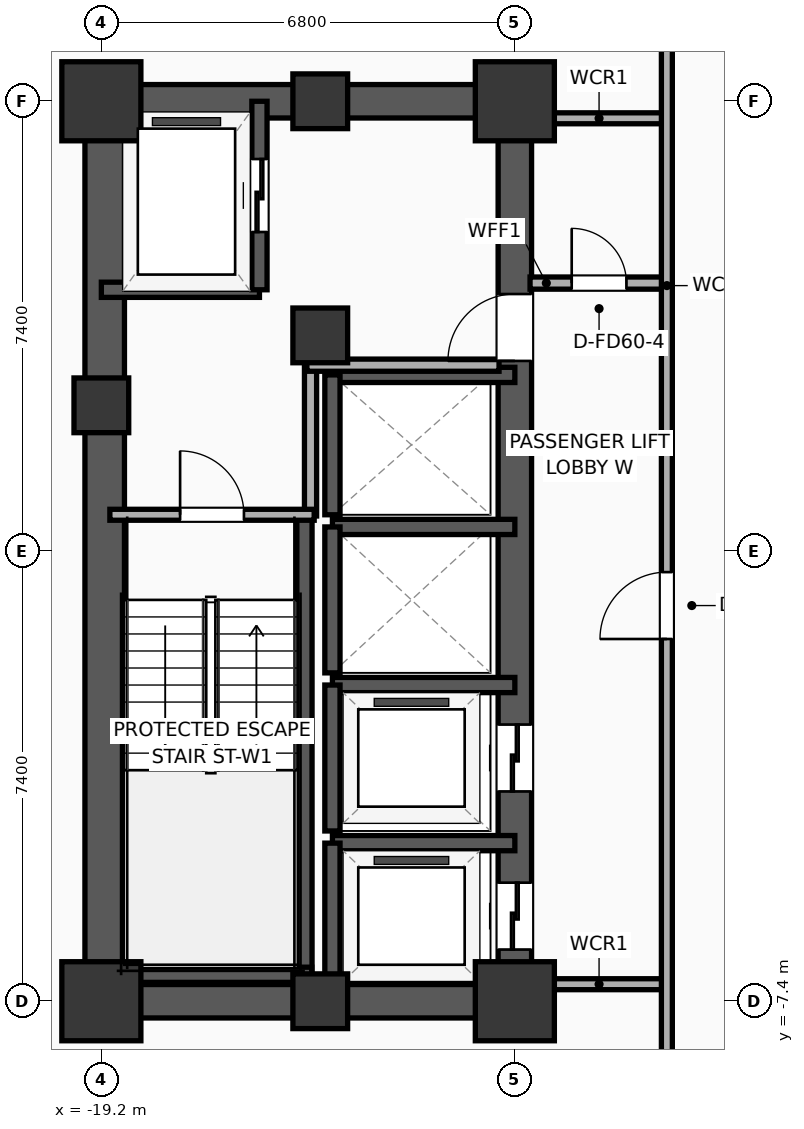
"""IFC4 building model, lengths in metres.
Left out: names, types, materials, properties, quantities, classifications, styles, units other than length and angle.
Written with IfcOpenShell. Run it as: python <this file> out.ifc"""

import sys

from ifc_helpers import new_model, si_unit, direction, frame, frame_2d, origin, origin_2d, place, context, subcontext, project, spatial, rectangle, extrude, element, fill, save


model = new_model("IFC4")
c1 = context("Model", 3, precision=1e-05, world=origin(), true_north=direction((0.0, 1.0)))
c2 = subcontext(c1, "Body", "Model", "MODEL_VIEW")
j1 = project(units=[si_unit("LENGTHUNIT", "METRE"), si_unit("PLANEANGLEUNIT", "RADIAN")], contexts=[c1])
p1 = place(None, origin())
s1 = spatial("IfcSite", under=j1, at=p1, CompositionType="ELEMENT")
p2 = place(p1, origin())
s2 = spatial("IfcBuilding", under=s1, at=p2, CompositionType="ELEMENT")
p3 = place(p2, frame((0.0, 0.0, 117.0)))
s3 = spatial("IfcBuildingStorey", under=s2, at=p3, CompositionType="ELEMENT", Elevation=117.0)
p4 = place(p3, frame((-19.2, -7.4, 0.0), z_axis=(0.0, 0.0, 1.0), x_axis=(1.0, 0.0, 0.0)))
e1 = element("IfcColumn", 1, at=p4, inside=s3, PredefinedType="COLUMN", context=c2, shape_type="SweptSolid", body=[
    extrude(rectangle(XDim=1.3, YDim=1.3, at=origin_2d()), origin(), (0.0, 0.0, 1.0), 3.9),
])
p5 = place(p3, frame((-19.2, 2.4, 0.0), z_axis=(0.0, 0.0, 1.0), x_axis=(1.0, 0.0, 0.0)))
e2 = element("IfcColumn", 2, at=p5, inside=s3, PredefinedType="COLUMN", context=c2, shape_type="SweptSolid", body=[
    extrude(rectangle(XDim=0.9, YDim=0.9, at=origin_2d()), origin(), (0.0, 0.0, 1.0), 3.9),
])
p6 = place(p3, frame((-19.2, 7.4, 0.0), z_axis=(0.0, 0.0, 1.0), x_axis=(1.0, 0.0, 0.0)))
e3 = element("IfcColumn", 3, at=p6, inside=s3, PredefinedType="COLUMN", context=c2, shape_type="SweptSolid", body=[
    extrude(rectangle(XDim=1.3, YDim=1.3, at=origin_2d()), origin(), (0.0, 0.0, 1.0), 3.9),
])
for number, where, z_axis, x_axis in (
    (4, (-15.6, -7.4, 0.0), (0.0, 0.0, 1.0), (1.0, 0.0, 0.0)),
    (5, (-15.6, 7.4, 0.0), (0.0, 0.0, 1.0), (1.0, 0.0, 0.0)),
):
    element("IfcColumn", number, at=place(p3, frame(where, z_axis=z_axis, x_axis=x_axis)), inside=s3, PredefinedType="COLUMN", context=c2, shape_type="SweptSolid", body=[
        extrude(rectangle(XDim=0.9, YDim=0.9, at=origin_2d()), origin(), (0.0, 0.0, 1.0), 3.9),
    ])
p7 = place(p3, frame((-12.4, -7.4, 0.0), z_axis=(0.0, 0.0, 1.0), x_axis=(1.0, 0.0, 0.0)))
e6 = element("IfcColumn", 6, at=p7, inside=s3, PredefinedType="COLUMN", context=c2, shape_type="SweptSolid", body=[
    extrude(rectangle(XDim=1.3, YDim=1.3, at=origin_2d()), origin(), (0.0, 0.0, 1.0), 3.9),
])
p8 = place(p3, frame((-15.6, 3.55, 0.0), z_axis=(0.0, 0.0, 1.0), x_axis=(1.0, 0.0, 0.0)))
e7 = element("IfcColumn", 7, at=p8, inside=s3, PredefinedType="COLUMN", context=c2, shape_type="SweptSolid", body=[
    extrude(rectangle(XDim=0.9, YDim=0.9, at=origin_2d()), origin(), (0.0, 0.0, 1.0), 3.9),
])
p9 = place(p3, frame((-12.4, 7.4, 0.0), z_axis=(0.0, 0.0, 1.0), x_axis=(1.0, 0.0, 0.0)))
e8 = element("IfcColumn", 8, at=p9, inside=s3, PredefinedType="COLUMN", context=c2, shape_type="SweptSolid", body=[
    extrude(rectangle(XDim=1.3, YDim=1.3, at=origin_2d()), origin(), (0.0, 0.0, 1.0), 3.9),
])
for number, where, z_axis, x_axis in (
    (9, (-19.475, -7.4, 0.0), (0.0, 0.0, 1.0), (1.0, 0.0, 0.0)),
    (10, (-19.475, 7.4, 0.0), (0.0, 0.0, 1.0), (1.0, 0.0, 0.0)),
):
    element("IfcWall", number, at=place(p3, frame(where, z_axis=z_axis, x_axis=x_axis)), inside=s3, PredefinedType="SHEAR", context=c2, shape_type="SweptSolid", body=[
        extrude(rectangle(XDim=7.35, YDim=0.55, at=frame_2d((3.675, 0.0))), origin(), (0.0, 0.0, 1.0), 3.65),
    ])
p10 = place(p3, frame((-19.145, -7.4, 0.0), z_axis=(0.0, 0.0, 1.0), x_axis=(0.0, 1.0, 0.0)))
e11 = element("IfcWall", 11, at=p10, inside=s3, PredefinedType="SHEAR", context=c2, shape_type="SweptSolid", body=[
    extrude(rectangle(XDim=14.8, YDim=0.65, at=frame_2d((7.4, 0.0))), origin(), (0.0, 0.0, 1.0), 3.65),
])
p11 = place(p3, frame((-12.4, -7.4, 0.0), z_axis=(0.0, 0.0, 1.0), x_axis=(0.0, 1.0, 0.0)))
e12 = element("IfcWall", 12, at=p11, inside=s3, PredefinedType="SHEAR", context=c2, shape_type="SweptSolid", body=[
    extrude(rectangle(XDim=14.8, YDim=0.55, at=frame_2d((7.4, 0.0))), origin(), (0.0, 0.0, 1.0), 3.65),
])
p12 = place(p11, frame((0.85, 0.0, 0.0)))
e13 = element("IfcOpeningElement", 13, at=p12, cuts=e12, PredefinedType="OPENING", context=c2, shape_type="SweptSolid", body=[
    extrude(rectangle(XDim=1.1, YDim=2.05, at=frame_2d((0.55, 1.025))), frame((0.0, 0.285, 0.0), z_axis=(0.0, -1.0, 0.0), x_axis=(1.0, 0.0, 0.0)), (0.0, 0.0, 1.0), 0.57),
])
p13 = place(p11, frame((3.45, 0.0, 0.0)))
e14 = element("IfcOpeningElement", 14, at=p13, cuts=e12, PredefinedType="OPENING", context=c2, shape_type="SweptSolid", body=[
    extrude(rectangle(XDim=1.1, YDim=2.05, at=frame_2d((0.55, 1.025))), frame((0.0, 0.285, 0.0), z_axis=(0.0, -1.0, 0.0), x_axis=(1.0, 0.0, 0.0)), (0.0, 0.0, 1.0), 0.57),
])
p14 = place(p11, frame((10.53, 0.0, 0.0)))
e15 = element("IfcOpeningElement", 15, at=p14, cuts=e12, PredefinedType="OPENING", context=c2, shape_type="SweptSolid", body=[
    extrude(rectangle(XDim=1.1, YDim=2.05, at=frame_2d((0.55, 1.025))), frame((0.0, 0.285, 0.0), z_axis=(0.0, -1.0, 0.0), x_axis=(1.0, 0.0, 0.0)), (0.0, 0.0, 1.0), 0.57),
])
p15 = place(p3, frame((-15.86, -7.085, 0.0), z_axis=(0.0, 0.0, 1.0), x_axis=(0.0, 1.0, 0.0)))
e16 = element("IfcWall", 16, at=p15, inside=s3, PredefinedType="SOLIDWALL", context=c2, shape_type="SweptSolid", body=[
    extrude(rectangle(XDim=7.685, YDim=0.25, at=frame_2d((3.843, 0.0))), origin(), (0.0, 0.0, 1.0), 3.65),
])
p16 = place(p3, frame((-19.2, -6.965, 0.0), z_axis=(0.0, 0.0, 1.0), x_axis=(1.0, 0.0, 0.0)))
e17 = element("IfcWall", 17, at=p16, inside=s3, PredefinedType="SOLIDWALL", context=c2, shape_type="SweptSolid", body=[
    extrude(rectangle(XDim=3.46, YDim=0.25, at=frame_2d((1.73, 0.0))), origin(), (0.0, 0.0, 1.0), 3.65),
])
p17 = place(p3, frame((-19.2, 4.3, 0.0), z_axis=(0.0, 0.0, 1.0), x_axis=(1.0, 0.0, 0.0)))
e18 = element("IfcWall", 18, at=p17, inside=s3, PredefinedType="SOLIDWALL", context=c2, shape_type="SweptSolid", body=[
    extrude(rectangle(XDim=2.6, YDim=0.25, at=frame_2d((1.3, 0.0))), origin(), (0.0, 0.0, 1.0), 3.65),
])
p18 = place(p3, frame((-16.6, 4.3, 0.0), z_axis=(0.0, 0.0, 1.0), x_axis=(0.0, 1.0, 0.0)))
e19 = element("IfcWall", 19, at=p18, inside=s3, PredefinedType="SOLIDWALL", context=c2, shape_type="SweptSolid", body=[
    extrude(rectangle(XDim=3.1, YDim=0.25, at=frame_2d((1.55, 0.0))), origin(), (0.0, 0.0, 1.0), 3.65),
])
p19 = place(p18, frame((0.95, 0.0, 0.0)))
e20 = element("IfcOpeningElement", 20, at=p19, cuts=e19, PredefinedType="OPENING", context=c2, shape_type="SweptSolid", body=[
    extrude(rectangle(XDim=1.2, YDim=2.05, at=frame_2d((0.6, 1.025))), frame((0.0, 0.135, 0.0), z_axis=(0.0, -1.0, 0.0), x_axis=(1.0, 0.0, 0.0)), (0.0, 0.0, 1.0), 0.27),
])
p20 = place(p3, frame((-12.4, -4.8, 0.0), z_axis=(0.0, 0.0, 1.0), x_axis=(-1.0, 0.0, 0.0)))
e21 = element("IfcWall", 21, at=p20, inside=s3, PredefinedType="SOLIDWALL", context=c2, shape_type="SweptSolid", body=[
    extrude(rectangle(XDim=3.0, YDim=0.25, at=frame_2d((1.5, 0.0))), origin(), (0.0, 0.0, 1.0), 3.65),
])
p21 = place(p3, frame((-15.4, -4.8, 0.0), z_axis=(0.0, 0.0, 1.0), x_axis=(0.0, -1.0, 0.0)))
e22 = element("IfcWall", 22, at=p21, inside=s3, PredefinedType="SOLIDWALL", context=c2, shape_type="SweptSolid", body=[
    extrude(rectangle(XDim=2.6, YDim=0.25, at=frame_2d((1.3, 0.0))), origin(), (0.0, 0.0, 1.0), 3.65),
])
p22 = place(p3, frame((-12.4, -2.2, 0.0), z_axis=(0.0, 0.0, 1.0), x_axis=(-1.0, 0.0, 0.0)))
e23 = element("IfcWall", 23, at=p22, inside=s3, PredefinedType="SOLIDWALL", context=c2, shape_type="SweptSolid", body=[
    extrude(rectangle(XDim=3.0, YDim=0.25, at=frame_2d((1.5, 0.0))), origin(), (0.0, 0.0, 1.0), 3.65),
])
p23 = place(p3, frame((-15.4, -2.2, 0.0), z_axis=(0.0, 0.0, 1.0), x_axis=(0.0, -1.0, 0.0)))
e24 = element("IfcWall", 24, at=p23, inside=s3, PredefinedType="SOLIDWALL", context=c2, shape_type="SweptSolid", body=[
    extrude(rectangle(XDim=2.4, YDim=0.25, at=frame_2d((1.2, 0.0))), origin(), (0.0, 0.0, 1.0), 3.65),
])
p24 = place(p3, frame((-12.4, 0.4, 0.0), z_axis=(0.0, 0.0, 1.0), x_axis=(-1.0, 0.0, 0.0)))
e25 = element("IfcWall", 25, at=p24, inside=s3, PredefinedType="SOLIDWALL", context=c2, shape_type="SweptSolid", body=[
    extrude(rectangle(XDim=3.0, YDim=0.25, at=frame_2d((1.5, 0.0))), origin(), (0.0, 0.0, 1.0), 3.65),
])
p25 = place(p3, frame((-15.4, 0.4, 0.0), z_axis=(0.0, 0.0, 1.0), x_axis=(0.0, -1.0, 0.0)))
e26 = element("IfcWall", 26, at=p25, inside=s3, PredefinedType="SOLIDWALL", context=c2, shape_type="SweptSolid", body=[
    extrude(rectangle(XDim=2.4, YDim=0.25, at=frame_2d((1.2, 0.0))), origin(), (0.0, 0.0, 1.0), 3.65),
])
p26 = place(p3, frame((-12.4, 2.9, 0.0), z_axis=(0.0, 0.0, 1.0), x_axis=(-1.0, 0.0, 0.0)))
e27 = element("IfcWall", 27, at=p26, inside=s3, PredefinedType="SOLIDWALL", context=c2, shape_type="SweptSolid", body=[
    extrude(rectangle(XDim=3.0, YDim=0.25, at=frame_2d((1.5, 0.0))), origin(), (0.0, 0.0, 1.0), 3.65),
])
p27 = place(p3, frame((-15.4, 2.9, 0.0), z_axis=(0.0, 0.0, 1.0), x_axis=(0.0, -1.0, 0.0)))
e28 = element("IfcWall", 28, at=p27, inside=s3, PredefinedType="SOLIDWALL", context=c2, shape_type="SweptSolid", body=[
    extrude(rectangle(XDim=2.3, YDim=0.25, at=frame_2d((1.15, 0.0))), origin(), (0.0, 0.0, 1.0), 3.65),
])
p28 = place(p3, frame((-15.76, 0.58, 0.0), z_axis=(0.0, 0.0, 1.0), x_axis=(0.0, 1.0, 0.0)))
e29 = element("IfcWall", 29, at=p28, inside=s3, PredefinedType="PARTITIONING", context=c2, shape_type="SweptSolid", body=[
    extrude(rectangle(XDim=2.52, YDim=0.2, at=frame_2d((1.26, 0.0))), origin(), (0.0, 0.0, 1.0), 3.65),
])
p29 = place(p3, frame((-15.82, 3.06, 0.0), z_axis=(0.0, 0.0, 1.0), x_axis=(1.0, 0.0, 0.0)))
e30 = element("IfcWall", 30, at=p29, inside=s3, PredefinedType="PARTITIONING", context=c2, shape_type="SweptSolid", body=[
    extrude(rectangle(XDim=3.16, YDim=0.2, at=frame_2d((1.58, 0.0))), origin(), (0.0, 0.0, 1.0), 3.65),
])
p30 = place(p3, frame((-19.06, 0.6, 0.0), z_axis=(0.0, 0.0, 1.0), x_axis=(1.0, 0.0, 0.0)))
e31 = element("IfcWall", 31, at=p30, inside=s3, PredefinedType="PARTITIONING", context=c2, shape_type="SweptSolid", body=[
    extrude(rectangle(XDim=3.36, YDim=0.18, at=frame_2d((1.68, 0.0))), origin(), (0.0, 0.0, 1.0), 3.65),
])
p31 = place(p30, frame((1.155, 0.0, 0.0)))
e32 = element("IfcOpeningElement", 32, at=p31, cuts=e31, PredefinedType="OPENING", context=c2, shape_type="SweptSolid", body=[
    extrude(rectangle(XDim=1.05, YDim=2.05, at=frame_2d((0.525, 1.025))), frame((0.0, 0.1, 0.0), z_axis=(0.0, -1.0, 0.0), x_axis=(1.0, 0.0, 0.0)), (0.0, 0.0, 1.0), 0.2),
])
p32 = place(p3, frame((-12.15, 4.41, 0.0), z_axis=(0.0, 0.0, 1.0), x_axis=(1.0, 0.0, 0.0)))
e33 = element("IfcWall", 33, at=p32, inside=s3, PredefinedType="PARTITIONING", context=c2, shape_type="SweptSolid", body=[
    extrude(rectangle(XDim=2.27, YDim=0.2, at=frame_2d((1.135, 0.0))), origin(), (0.0, 0.0, 1.0), 3.65),
])
p33 = place(p32, frame((0.685, 0.0, 0.0)))
e34 = element("IfcOpeningElement", 34, at=p33, cuts=e33, PredefinedType="OPENING", context=c2, shape_type="SweptSolid", body=[
    extrude(rectangle(XDim=0.9, YDim=2.05, at=frame_2d((0.45, 1.025))), frame((0.0, 0.11, 0.0), z_axis=(0.0, -1.0, 0.0), x_axis=(1.0, 0.0, 0.0)), (0.0, 0.0, 1.0), 0.22),
])
for number, where, z_axis, x_axis in (
    (35, (-12.15, 7.12, 0.0), (0.0, 0.0, 1.0), (1.0, 0.0, 0.0)),
    (36, (-12.15, -7.12, 0.0), (0.0, 0.0, 1.0), (1.0, 0.0, 0.0)),
):
    element("IfcWall", number, at=place(p3, frame(where, z_axis=z_axis, x_axis=x_axis)), inside=s3, PredefinedType="PARTITIONING", context=c2, shape_type="SweptSolid", body=[
        extrude(rectangle(XDim=2.27, YDim=0.18, at=frame_2d((1.135, 0.0))), origin(), (0.0, 0.0, 1.0), 3.65),
    ])
p34 = place(p3, frame((-9.9, -8.93, 0.0), z_axis=(0.0, 0.0, 1.0), x_axis=(0.0, 1.0, 0.0)))
e37 = element("IfcWall", 37, at=p34, inside=s3, PredefinedType="PARTITIONING", context=c2, shape_type="SweptSolid", body=[
    extrude(rectangle(XDim=17.86, YDim=0.18, at=frame_2d((8.93, 0.0))), origin(), (0.0, 0.0, 1.0), 3.65),
])
p35 = place(p34, frame((7.487, 0.0, 0.0)))
e38 = element("IfcOpeningElement", 38, at=p35, cuts=e37, PredefinedType="OPENING", context=c2, shape_type="SweptSolid", body=[
    extrude(rectangle(XDim=1.1, YDim=2.05, at=frame_2d((0.55, 1.025))), frame((0.0, 0.1, 0.0), z_axis=(0.0, -1.0, 0.0), x_axis=(1.0, 0.0, 0.0)), (0.0, 0.0, 1.0), 0.2),
])
p36 = place(p19, origin())
e39 = element("IfcDoor", 39, at=p36, inside=s3, OperationType="SLIDING_TO_LEFT", PredefinedType="DOOR", context=c2, shape_type="SweptSolid", body=[
    extrude(rectangle(XDim=1.2, YDim=2.05, at=frame_2d((0.6, 1.025))), frame((0.0, 0.025, 0.0), z_axis=(0.0, -1.0, 0.0), x_axis=(1.0, 0.0, 0.0)), (0.0, 0.0, 1.0), 0.05),
])
fill(e20, e39)
p37 = place(p12, origin())
e40 = element("IfcDoor", 40, at=p37, inside=s3, OperationType="SLIDING_TO_LEFT", PredefinedType="DOOR", context=c2, shape_type="SweptSolid", body=[
    extrude(rectangle(XDim=1.1, YDim=2.05, at=frame_2d((0.55, 1.025))), frame((0.0, 0.025, 0.0), z_axis=(0.0, -1.0, 0.0), x_axis=(1.0, 0.0, 0.0)), (0.0, 0.0, 1.0), 0.05),
])
fill(e13, e40)
p38 = place(p13, origin())
e41 = element("IfcDoor", 41, at=p38, inside=s3, OperationType="SLIDING_TO_LEFT", PredefinedType="DOOR", context=c2, shape_type="SweptSolid", body=[
    extrude(rectangle(XDim=1.1, YDim=2.05, at=frame_2d((0.55, 1.025))), frame((0.0, 0.025, 0.0), z_axis=(0.0, -1.0, 0.0), x_axis=(1.0, 0.0, 0.0)), (0.0, 0.0, 1.0), 0.05),
])
fill(e14, e41)
p39 = place(p31, origin())
e42 = element("IfcDoor", 42, at=p39, inside=s3, OperationType="SINGLE_SWING_LEFT", PredefinedType="DOOR", context=c2, shape_type="SweptSolid", body=[
    extrude(rectangle(XDim=1.05, YDim=2.05, at=frame_2d((0.525, 1.025))), frame((0.0, 0.025, 0.0), z_axis=(0.0, -1.0, 0.0), x_axis=(1.0, 0.0, 0.0)), (0.0, 0.0, 1.0), 0.05),
])
fill(e32, e42)
p40 = place(p33, origin())
e43 = element("IfcDoor", 43, at=p40, inside=s3, OperationType="SINGLE_SWING_LEFT", PredefinedType="DOOR", context=c2, shape_type="SweptSolid", body=[
    extrude(rectangle(XDim=0.9, YDim=2.05, at=frame_2d((0.45, 1.025))), frame((0.0, 0.025, 0.0), z_axis=(0.0, -1.0, 0.0), x_axis=(1.0, 0.0, 0.0)), (0.0, 0.0, 1.0), 0.05),
])
fill(e34, e43)
p41 = place(p35, origin())
e44 = element("IfcDoor", 44, at=p41, inside=s3, OperationType="SINGLE_SWING_LEFT", PredefinedType="DOOR", context=c2, shape_type="SweptSolid", body=[
    extrude(rectangle(XDim=1.1, YDim=2.05, at=frame_2d((0.55, 1.025))), frame((0.0, 0.025, 0.0), z_axis=(0.0, -1.0, 0.0), x_axis=(1.0, 0.0, 0.0)), (0.0, 0.0, 1.0), 0.05),
])
fill(e38, e44)
p42 = place(p14, origin())
e45 = element("IfcDoor", 45, at=p42, inside=s3, OperationType="SINGLE_SWING_LEFT", PredefinedType="DOOR", context=c2, shape_type="SweptSolid", body=[
    extrude(rectangle(XDim=1.1, YDim=2.05, at=frame_2d((0.55, 1.025))), frame((0.0, 0.025, 0.0), z_axis=(0.0, -1.0, 0.0), x_axis=(1.0, 0.0, 0.0)), (0.0, 0.0, 1.0), 0.05),
])
fill(e15, e45)
save(model, sys.argv[1])
